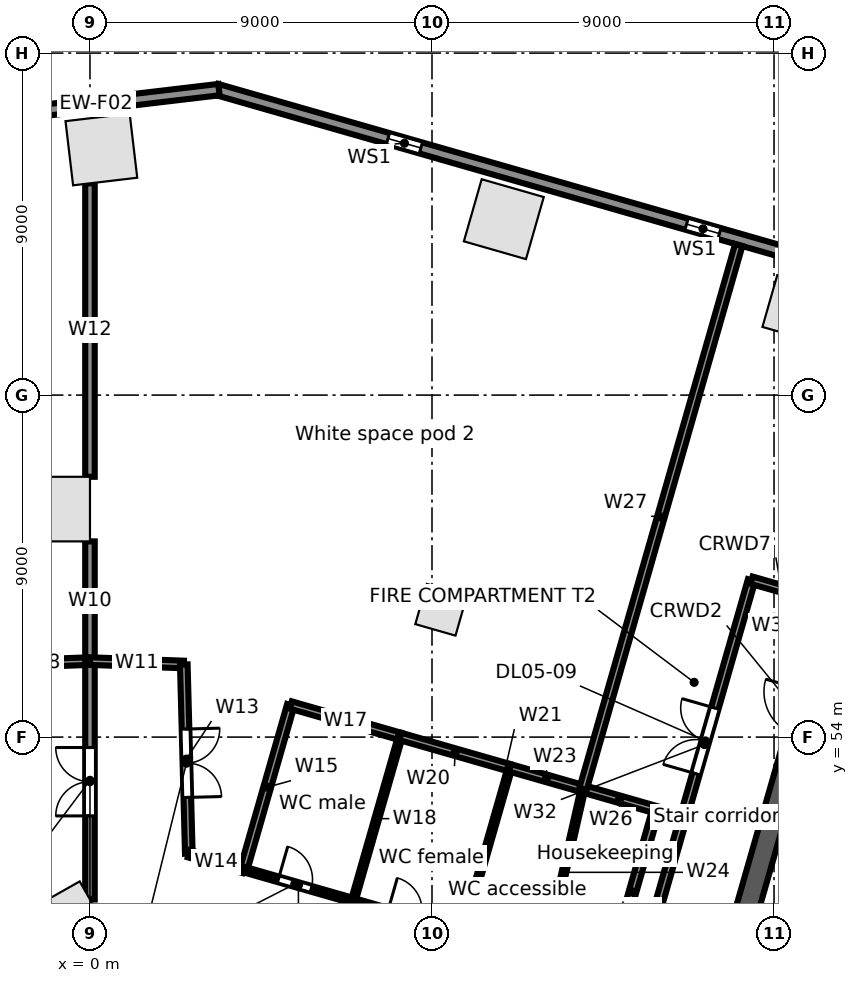
"""IFC4 building model, lengths in metres.
Left out: names, types, materials, properties, quantities, classifications, styles, units other than length and angle.
Written with IfcOpenShell. Run it as: python <this file> out.ifc"""

import sys

from ifc_helpers import new_model, si_unit, direction, frame, frame_2d, origin, origin_2d, place, context, subcontext, project, spatial, rectangle, extrude, element, fill, save


model = new_model("IFC4")
c1 = context("Model", 3, precision=1e-05, world=origin(), true_north=direction((0.0, 1.0)))
c2 = subcontext(c1, "Body", "Model", "MODEL_VIEW")
j1 = project(units=[si_unit("LENGTHUNIT", "METRE"), si_unit("PLANEANGLEUNIT", "RADIAN")], contexts=[c1])
p1 = place(None, origin())
s1 = spatial("IfcSite", under=j1, at=p1, CompositionType="ELEMENT")
p2 = place(p1, origin())
s2 = spatial("IfcBuilding", under=s1, at=p2, CompositionType="ELEMENT")
p3 = place(p2, frame((0.0, 0.0, 31.5)))
s3 = spatial("IfcBuildingStorey", under=s2, at=p3, CompositionType="ELEMENT", Elevation=31.5)
for number, where, z_axis, x_axis in (
    (1, (18.746, 65.376, 0.0), (0.0, 0.0, 1.0), (-0.961, 0.276, 0.0)),
    (2, (10.89, 67.629, 0.0), (0.0, 0.0, 1.0), (-0.961, 0.276, 0.0)),
    (3, (0.3, 69.464, 0.0), (0.0, 0.0, 1.0), (-0.993, -0.118, 0.0)),
    (4, (-0.591, 49.044, 0.0), (0.0, 0.0, 1.0), (0.87, 0.492, 0.0)),
    (5, (-0.85, 60.0, 0.0), (0.0, 0.0, 1.0), (0.0, 1.0, 0.0)),
):
    element("IfcColumn", number, at=place(p3, frame(where, z_axis=z_axis, x_axis=x_axis)), inside=s3, PredefinedType="COLUMN", context=c2, shape_type="SweptSolid", body=[
        extrude(rectangle(XDim=1.7, YDim=1.7, at=origin_2d()), origin(), (0.0, 0.0, 1.0), 5.0),
    ])
p4 = place(p3, frame((9.241, 57.35, 0.0), z_axis=(0.0, 0.0, 1.0), x_axis=(0.961261695938, -0.275637355817, 0.0)))
e6 = element("IfcColumn", 6, at=p4, inside=s3, PredefinedType="COLUMN", context=c2, shape_type="SweptSolid", body=[
    extrude(rectangle(XDim=1.1, YDim=1.1, at=origin_2d()), origin(), (0.0, 0.0, 1.0), 5.0),
])
p5 = place(p3, frame((3.335, 71.044, 0.0), z_axis=(0.0, 0.0, 1.0), x_axis=(0.961260130989, -0.275642813387, 0.0)))
e7 = element("IfcWall", 7, at=p5, inside=s3, PredefinedType="STANDARD", context=c2, shape_type="SweptSolid", body=[
    extrude(rectangle(XDim=32.741, YDim=0.3, at=frame_2d((16.371, 0.0))), origin(), (0.0, 0.0, 1.0), 4.68),
])
p6 = place(p5, frame((29.207, 0.0, 0.6)))
e8 = element("IfcOpeningElement", 8, at=p6, cuts=e7, PredefinedType="OPENING", context=c2, shape_type="SweptSolid", body=[
    extrude(rectangle(XDim=0.9, YDim=3.2, at=frame_2d((0.45, 1.6))), frame((0.0, 0.16, 0.0), z_axis=(0.0, -1.0, 0.0), x_axis=(1.0, 0.0, 0.0)), (0.0, 0.0, 1.0), 0.32),
])
p7 = place(p5, frame((21.034, 0.0, 0.6)))
e9 = element("IfcOpeningElement", 9, at=p7, cuts=e7, PredefinedType="OPENING", context=c2, shape_type="SweptSolid", body=[
    extrude(rectangle(XDim=0.9, YDim=3.2, at=frame_2d((0.45, 1.6))), frame((0.0, 0.16, 0.0), z_axis=(0.0, -1.0, 0.0), x_axis=(1.0, 0.0, 0.0)), (0.0, 0.0, 1.0), 0.32),
])
p8 = place(p5, frame((12.861, 0.0, 0.6)))
e10 = element("IfcOpeningElement", 10, at=p8, cuts=e7, PredefinedType="OPENING", context=c2, shape_type="SweptSolid", body=[
    extrude(rectangle(XDim=0.9, YDim=3.2, at=frame_2d((0.45, 1.6))), frame((0.0, 0.16, 0.0), z_axis=(0.0, -1.0, 0.0), x_axis=(1.0, 0.0, 0.0)), (0.0, 0.0, 1.0), 0.32),
])
p9 = place(p5, frame((4.688, 0.0, 0.6)))
e11 = element("IfcOpeningElement", 11, at=p9, cuts=e7, PredefinedType="OPENING", context=c2, shape_type="SweptSolid", body=[
    extrude(rectangle(XDim=0.9, YDim=3.2, at=frame_2d((0.45, 1.6))), frame((0.0, 0.16, 0.0), z_axis=(0.0, -1.0, 0.0), x_axis=(1.0, 0.0, 0.0)), (0.0, 0.0, 1.0), 0.32),
])
p10 = place(p3, frame((-3.076, 70.273, 0.0), z_axis=(0.0, 0.0, 1.0), x_axis=(0.993067743007, 0.117543429416, 0.0)))
e12 = element("IfcWall", 12, at=p10, inside=s3, PredefinedType="STANDARD", context=c2, shape_type="SweptSolid", body=[
    extrude(rectangle(XDim=6.516, YDim=0.3, at=frame_2d((3.258, 0.0))), origin(), (0.0, 0.0, 1.0), 4.68),
])
p11 = place(p3, frame((17.282, 49.427, 0.0), z_axis=(0.0, 0.0, 1.0), x_axis=(0.275631631629, 0.961263337304, 0.0)))
e13 = element("IfcWall", 13, at=p11, inside=s3, PredefinedType="SOLIDWALL", context=c2, shape_type="SweptSolid", body=[
    extrude(rectangle(XDim=10.8, YDim=0.6, at=frame_2d((5.4, 0.0))), origin(), (0.0, 0.0, 1.0), 4.68),
])
p12 = place(p11, frame((4.8, 0.0, 0.0)))
e14 = element("IfcOpeningElement", 14, at=p12, cuts=e13, PredefinedType="OPENING", context=c2, shape_type="SweptSolid", body=[
    extrude(rectangle(XDim=1.2, YDim=2.1, at=frame_2d((0.6, 1.05))), frame((0.0, 0.31, 0.0), z_axis=(0.0, -1.0, 0.0), x_axis=(1.0, 0.0, 0.0)), (0.0, 0.0, 1.0), 0.62),
])
p13 = place(p3, frame((-2.67, 55.904, 0.0), z_axis=(0.0, 0.0, 1.0), x_axis=(0.999354913865, 0.03591317494, 0.0)))
e15 = element("IfcWall", 15, at=p13, inside=s3, PredefinedType="PARTITIONING", context=c2, shape_type="SweptSolid", body=[
    extrude(rectangle(XDim=2.672, YDim=0.2, at=frame_2d((1.336, 0.0))), origin(), (0.0, 0.0, 1.0), 3.742),
])
p14 = place(p3, frame((0.0, 49.726, 0.0), z_axis=(0.0, 0.0, 1.0), x_axis=(0.0, 1.0, 0.0)))
e16 = element("IfcWall", 16, at=p14, inside=s3, PredefinedType="PARTITIONING", context=c2, shape_type="SweptSolid", body=[
    extrude(rectangle(XDim=6.274, YDim=0.25, at=frame_2d((3.137, 0.0))), origin(), (0.0, 0.0, 1.0), 4.68),
])
p15 = place(p14, frame((2.2, 0.0, 0.0)))
e17 = element("IfcOpeningElement", 17, at=p15, cuts=e16, PredefinedType="OPENING", context=c2, shape_type="SweptSolid", body=[
    extrude(rectangle(XDim=1.8, YDim=2.1, at=frame_2d((0.9, 1.05))), frame((0.0, 0.135, 0.0), z_axis=(0.0, -1.0, 0.0), x_axis=(1.0, 0.0, 0.0)), (0.0, 0.0, 1.0), 0.27),
])
p16 = place(p3, frame((0.0, 56.0, 0.0), z_axis=(0.0, 0.0, 1.0), x_axis=(0.0, 1.0, 0.0)))
e18 = element("IfcWall", 18, at=p16, inside=s3, PredefinedType="PARTITIONING", context=c2, shape_type="SweptSolid", body=[
    extrude(rectangle(XDim=3.15, YDim=0.25, at=frame_2d((1.575, 0.0))), origin(), (0.0, 0.0, 1.0), 4.68),
])
p17 = place(p3, frame((0.0, 56.0, 0.0), z_axis=(0.0, 0.0, 1.0), x_axis=(0.999349313684, -0.036068673934, 0.0)))
e19 = element("IfcWall", 19, at=p17, inside=s3, PredefinedType="PARTITIONING", context=c2, shape_type="SweptSolid", body=[
    extrude(rectangle(XDim=2.471, YDim=0.2, at=frame_2d((1.235, 0.0))), origin(), (0.0, 0.0, 1.0), 4.68),
])
p18 = place(p3, frame((0.0, 60.85, 0.0), z_axis=(0.0, 0.0, 1.0), x_axis=(0.0, 1.0, 0.0)))
e20 = element("IfcWall", 20, at=p18, inside=s3, PredefinedType="PARTITIONING", context=c2, shape_type="SweptSolid", body=[
    extrude(rectangle(XDim=7.723, YDim=0.25, at=frame_2d((3.861, 0.0))), origin(), (0.0, 0.0, 1.0), 3.952),
])
p19 = place(p3, frame((2.469, 55.911, 0.0), z_axis=(0.0, 0.0, 1.0), x_axis=(0.02651808123, -0.999648333849, 0.0)))
e21 = element("IfcWall", 21, at=p19, inside=s3, PredefinedType="PARTITIONING", context=c2, shape_type="SweptSolid", body=[
    extrude(rectangle(XDim=4.981, YDim=0.2, at=frame_2d((2.49, 0.0))), origin(), (0.0, 0.0, 1.0), 4.68),
])
p20 = place(p19, frame((1.7, 0.0, 0.0)))
e22 = element("IfcOpeningElement", 22, at=p20, cuts=e21, PredefinedType="OPENING", context=c2, shape_type="SweptSolid", body=[
    extrude(rectangle(XDim=1.8, YDim=2.1, at=frame_2d((0.9, 1.05))), frame((0.0, 0.11, 0.0), z_axis=(0.0, -1.0, 0.0), x_axis=(1.0, 0.0, 0.0)), (0.0, 0.0, 1.0), 0.22),
])
p21 = place(p3, frame((2.601, 50.932, 0.0), z_axis=(0.0, 0.0, 1.0), x_axis=(0.961197773994, -0.27586018065, 0.0)))
e23 = element("IfcWall", 23, at=p21, inside=s3, PredefinedType="PARTITIONING", context=c2, shape_type="SweptSolid", body=[
    extrude(rectangle(XDim=1.5, YDim=0.2, at=frame_2d((0.75, 0.0))), origin(), (0.0, 0.0, 1.0), 4.68),
])
p22 = place(p3, frame((4.043, 50.518, 0.0), z_axis=(0.0, 0.0, 1.0), x_axis=(0.275745553681, 0.96123066411, 0.0)))
e24 = element("IfcWall", 24, at=p22, inside=s3, PredefinedType="PARTITIONING", context=c2, shape_type="SweptSolid", body=[
    extrude(rectangle(XDim=4.5, YDim=0.2, at=frame_2d((2.25, 0.0))), origin(), (0.0, 0.0, 1.0), 4.68),
])
p23 = place(p3, frame((4.043, 50.518, 0.0), z_axis=(0.0, 0.0, 1.0), x_axis=(0.961247103494, -0.275688240636, 0.0)))
e25 = element("IfcWall", 25, at=p23, inside=s3, PredefinedType="PARTITIONING", context=c2, shape_type="SweptSolid", body=[
    extrude(rectangle(XDim=3.0, YDim=0.15, at=frame_2d((1.5, 0.0))), origin(), (0.0, 0.0, 1.0), 4.68),
])
p24 = place(p23, frame((0.95, 0.0, 0.0)))
e26 = element("IfcOpeningElement", 26, at=p24, cuts=e25, PredefinedType="OPENING", context=c2, shape_type="SweptSolid", body=[
    extrude(rectangle(XDim=0.9, YDim=2.1, at=frame_2d((0.45, 1.05))), frame((0.0, 0.085, 0.0), z_axis=(0.0, -1.0, 0.0), x_axis=(1.0, 0.0, 0.0)), (0.0, 0.0, 1.0), 0.17),
])
p25 = place(p3, frame((5.284, 54.844, 0.0), z_axis=(0.0, 0.0, 1.0), x_axis=(0.961243927922, -0.275699312717, 0.0)))
e27 = element("IfcWall", 27, at=p25, inside=s3, PredefinedType="PARTITIONING", context=c2, shape_type="SweptSolid", body=[
    extrude(rectangle(XDim=2.999, YDim=0.2, at=frame_2d((1.5, 0.0))), origin(), (0.0, 0.0, 1.0), 4.68),
])
p26 = place(p3, frame((6.927, 49.691, 0.0), z_axis=(0.0, 0.0, 1.0), x_axis=(0.275530671241, 0.961292280841, 0.0)))
e28 = element("IfcWall", 28, at=p26, inside=s3, PredefinedType="PARTITIONING", context=c2, shape_type="SweptSolid", body=[
    extrude(rectangle(XDim=4.5, YDim=0.125, at=frame_2d((2.25, 0.0))), origin(), (0.0, 0.0, 1.0), 4.68),
])
p27 = place(p3, frame((6.927, 49.691, 0.0), z_axis=(0.0, 0.0, 1.0), x_axis=(0.961268664977, -0.27561305073, 0.0)))
e29 = element("IfcWall", 29, at=p27, inside=s3, PredefinedType="PARTITIONING", context=c2, shape_type="SweptSolid", body=[
    extrude(rectangle(XDim=3.0, YDim=0.15, at=frame_2d((1.5, 0.0))), origin(), (0.0, 0.0, 1.0), 3.742),
])
p28 = place(p27, frame((0.95, 0.0, 0.0)))
e30 = element("IfcOpeningElement", 30, at=p28, cuts=e29, PredefinedType="OPENING", context=c2, shape_type="SweptSolid", body=[
    extrude(rectangle(XDim=0.9, YDim=2.1, at=frame_2d((0.45, 1.05))), frame((0.0, 0.085, 0.0), z_axis=(0.0, -1.0, 0.0), x_axis=(1.0, 0.0, 0.0)), (0.0, 0.0, 1.0), 0.17),
])
p29 = place(p3, frame((8.167, 54.017, 0.0), z_axis=(0.0, 0.0, 1.0), x_axis=(0.961247103494, -0.275688240636, 0.0)))
e31 = element("IfcWall", 31, at=p29, inside=s3, PredefinedType="PARTITIONING", context=c2, shape_type="SweptSolid", body=[
    extrude(rectangle(XDim=3.0, YDim=0.2, at=frame_2d((1.5, 0.0))), origin(), (0.0, 0.0, 1.0), 3.742),
])
p30 = place(p3, frame((9.811, 48.864, 0.0), z_axis=(0.0, 0.0, 1.0), x_axis=(0.275545040649, 0.96128816209, 0.0)))
e32 = element("IfcWall", 32, at=p30, inside=s3, PredefinedType="PARTITIONING", context=c2, shape_type="SweptSolid", body=[
    extrude(rectangle(XDim=4.5, YDim=0.125, at=frame_2d((2.25, 0.0))), origin(), (0.0, 0.0, 1.0), 4.68),
])
p31 = place(p3, frame((11.051, 53.19, 0.0), z_axis=(0.0, 0.0, 1.0), x_axis=(0.961316434736, -0.275446387355, 0.0)))
e33 = element("IfcWall", 33, at=p31, inside=s3, PredefinedType="PARTITIONING", context=c2, shape_type="SweptSolid", body=[
    extrude(rectangle(XDim=2.0, YDim=0.2, at=frame_2d((1.0, 0.0))), origin(), (0.0, 0.0, 1.0), 4.68),
])
p32 = place(p3, frame((11.973, 48.244, 0.0), z_axis=(0.0, 0.0, 1.0), x_axis=(0.222117362571, 0.975019936845, 0.0)))
e34 = element("IfcWall", 34, at=p32, inside=s3, PredefinedType="PARTITIONING", context=c2, shape_type="SweptSolid", body=[
    extrude(rectangle(XDim=4.508, YDim=0.125, at=frame_2d((2.254, 0.0))), origin(), (0.0, 0.0, 1.0), 4.68),
])
p33 = place(p3, frame((12.974, 52.639, 0.0), z_axis=(0.0, 0.0, 1.0), x_axis=(0.961270097305, -0.275608055084, 0.0)))
e35 = element("IfcWall", 35, at=p33, inside=s3, PredefinedType="PARTITIONING", context=c2, shape_type="SweptSolid", body=[
    extrude(rectangle(XDim=1.999, YDim=0.2, at=frame_2d((1.0, 0.0))), origin(), (0.0, 0.0, 1.0), 4.68),
])
p34 = place(p3, frame((12.974, 52.639, 0.0), z_axis=(0.0, 0.0, 1.0), x_axis=(0.275299463768, 0.961358520662, 0.0)))
e36 = element("IfcWall", 36, at=p34, inside=s3, PredefinedType="PARTITIONING", context=c2, shape_type="SweptSolid", body=[
    extrude(rectangle(XDim=14.885, YDim=0.2, at=frame_2d((7.443, 0.0))), origin(), (0.0, 0.0, 1.0), 3.742),
])
p35 = place(p3, frame((13.656, 47.762, 0.0), z_axis=(0.0, 0.0, 1.0), x_axis=(0.275545040649, 0.96128816209, 0.0)))
e37 = element("IfcWall", 37, at=p35, inside=s3, PredefinedType="PARTITIONING", context=c2, shape_type="SweptSolid", body=[
    extrude(rectangle(XDim=4.5, YDim=0.2, at=frame_2d((2.25, 0.0))), origin(), (0.0, 0.0, 1.0), 4.68),
])
p36 = place(p3, frame((14.928, 49.478, 0.0), z_axis=(0.0, 0.0, 1.0), x_axis=(0.275674053528, 0.961251172281, 0.0)))
e38 = element("IfcWall", 38, at=p36, inside=s3, PredefinedType="PARTITIONING", context=c2, shape_type="SweptSolid", body=[
    extrude(rectangle(XDim=9.0, YDim=0.2, at=frame_2d((4.5, 0.0))), origin(), (0.0, 0.0, 1.0), 3.742),
])
p37 = place(p36, frame((3.7, 0.0, 0.0)))
e39 = element("IfcOpeningElement", 39, at=p37, cuts=e38, PredefinedType="OPENING", context=c2, shape_type="SweptSolid", body=[
    extrude(rectangle(XDim=1.8, YDim=2.1, at=frame_2d((0.9, 1.05))), frame((0.0, 0.11, 0.0), z_axis=(0.0, -1.0, 0.0), x_axis=(1.0, 0.0, 0.0)), (0.0, 0.0, 1.0), 0.22),
])
p38 = place(p3, frame((17.409, 58.129, 0.0), z_axis=(0.0, 0.0, 1.0), x_axis=(0.961253165474, -0.275667103345, 0.0)))
e40 = element("IfcWall", 40, at=p38, inside=s3, PredefinedType="PARTITIONING", context=c2, shape_type="SweptSolid", body=[
    extrude(rectangle(XDim=1.977, YDim=0.2, at=frame_2d((0.988, 0.0))), origin(), (0.0, 0.0, 1.0), 4.68),
])
p39 = place(p8, origin())
e41 = element("IfcWindow", 41, at=p39, inside=s3, PartitioningType="SINGLE_PANEL", PredefinedType="WINDOW", context=c2, shape_type="SweptSolid", body=[
    extrude(rectangle(XDim=0.9, YDim=3.2, at=frame_2d((0.45, 1.6))), frame((0.0, 0.03, 0.0), z_axis=(0.0, -1.0, 0.0), x_axis=(1.0, 0.0, 0.0)), (0.0, 0.0, 1.0), 0.06),
])
fill(e10, e41)
p40 = place(p9, origin())
e42 = element("IfcWindow", 42, at=p40, inside=s3, PartitioningType="SINGLE_PANEL", PredefinedType="WINDOW", context=c2, shape_type="SweptSolid", body=[
    extrude(rectangle(XDim=0.9, YDim=3.2, at=frame_2d((0.45, 1.6))), frame((0.0, 0.03, 0.0), z_axis=(0.0, -1.0, 0.0), x_axis=(1.0, 0.0, 0.0)), (0.0, 0.0, 1.0), 0.06),
])
fill(e11, e42)
p41 = place(p24, origin())
e43 = element("IfcDoor", 43, at=p41, inside=s3, OperationType="SINGLE_SWING_LEFT", PredefinedType="DOOR", context=c2, shape_type="SweptSolid", body=[
    extrude(rectangle(XDim=0.9, YDim=2.1, at=frame_2d((0.45, 1.05))), frame((0.0, 0.025, 0.0), z_axis=(0.0, -1.0, 0.0), x_axis=(1.0, 0.0, 0.0)), (0.0, 0.0, 1.0), 0.05),
])
fill(e26, e43)
p42 = place(p20, origin())
e44 = element("IfcDoor", 44, at=p42, inside=s3, OperationType="DOUBLE_DOOR_SINGLE_SWING", PredefinedType="DOOR", context=c2, shape_type="SweptSolid", body=[
    extrude(rectangle(XDim=1.8, YDim=2.1, at=frame_2d((0.9, 1.05))), frame((0.0, 0.025, 0.0), z_axis=(0.0, -1.0, 0.0), x_axis=(1.0, 0.0, 0.0)), (0.0, 0.0, 1.0), 0.05),
])
fill(e22, e44)
p43 = place(p37, origin())
e45 = element("IfcDoor", 45, at=p43, inside=s3, OperationType="DOUBLE_DOOR_SINGLE_SWING", PredefinedType="DOOR", context=c2, shape_type="SweptSolid", body=[
    extrude(rectangle(XDim=1.8, YDim=2.1, at=frame_2d((0.9, 1.05))), frame((0.0, 0.025, 0.0), z_axis=(0.0, -1.0, 0.0), x_axis=(1.0, 0.0, 0.0)), (0.0, 0.0, 1.0), 0.05),
])
fill(e39, e45)
p44 = place(p15, origin())
e46 = element("IfcDoor", 46, at=p44, inside=s3, OperationType="DOUBLE_DOOR_SINGLE_SWING", PredefinedType="DOOR", context=c2, shape_type="SweptSolid", body=[
    extrude(rectangle(XDim=1.8, YDim=2.1, at=frame_2d((0.9, 1.05))), frame((0.0, 0.025, 0.0), z_axis=(0.0, -1.0, 0.0), x_axis=(1.0, 0.0, 0.0)), (0.0, 0.0, 1.0), 0.05),
])
fill(e17, e46)
save(model, sys.argv[1])
